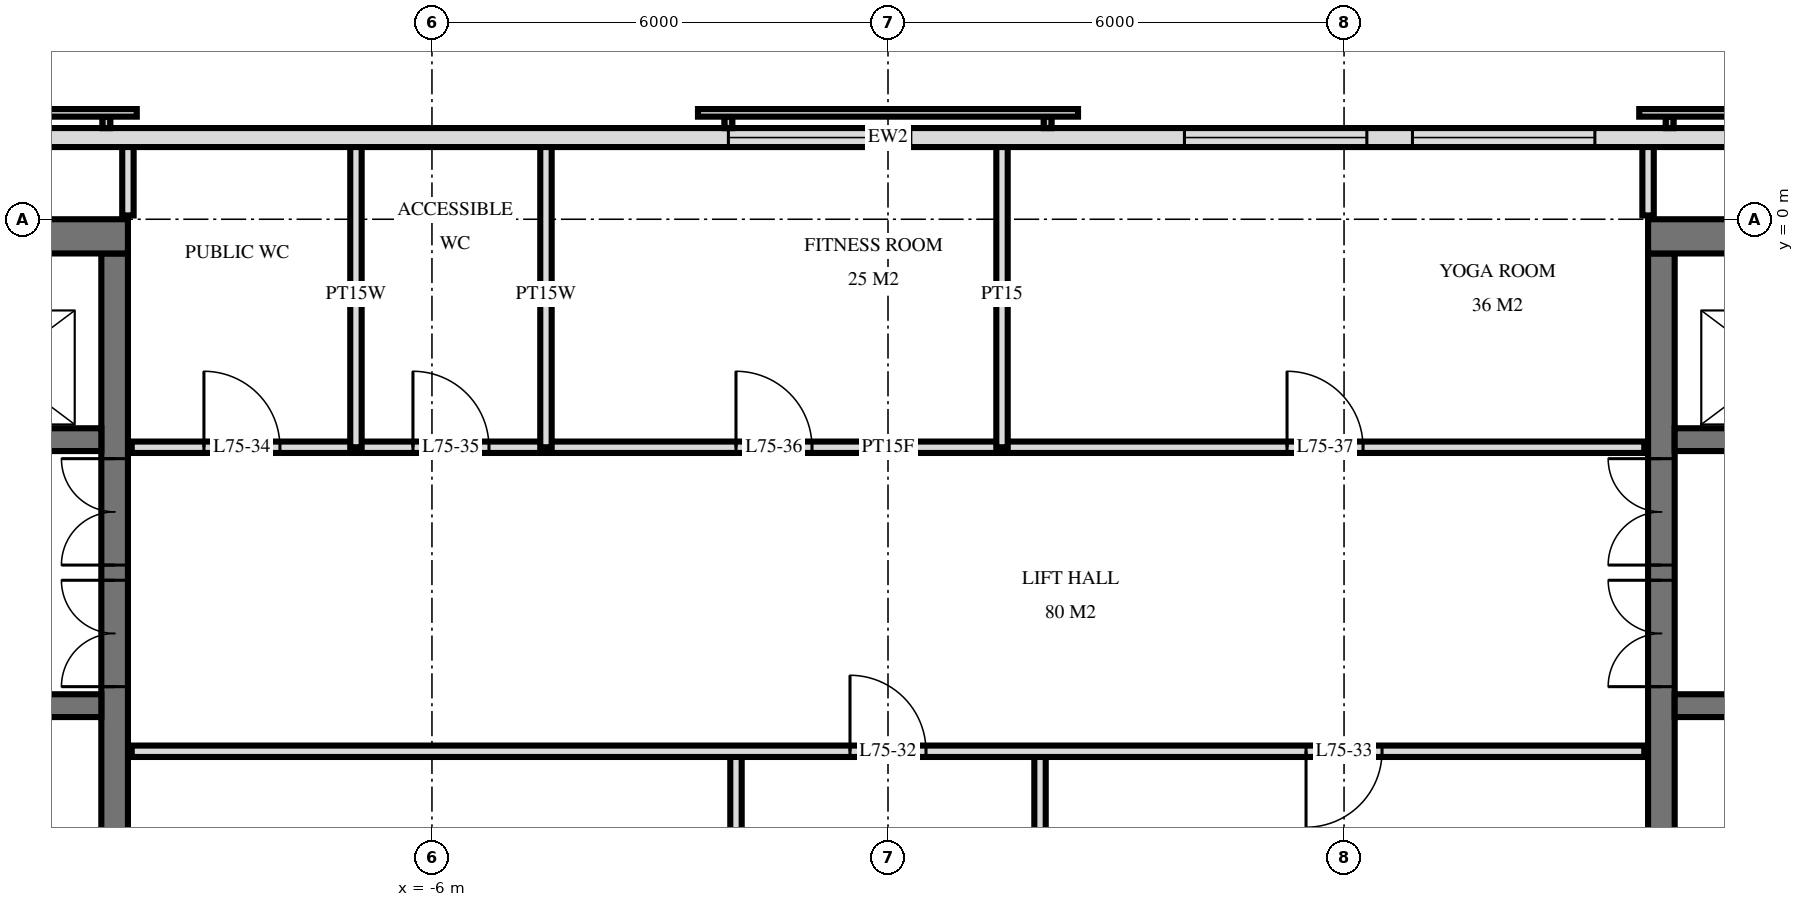
"""IFC4 building model, lengths in metres.
Left out: names, types, materials, properties, quantities, classifications, styles, units other than length and angle.
Written with IfcOpenShell. Run it as: python <this file> out.ifc"""

import sys

from ifc_helpers import new_model, si_unit, direction, frame, frame_2d, origin, place, context, subcontext, project, spatial, rectangle, extrude, element, fill, save


model = new_model("IFC4")
c1 = context("Model", 3, precision=1e-05, world=origin(), true_north=direction((0.0, 1.0)))
c2 = subcontext(c1, "Body", "Model", "MODEL_VIEW")
j1 = project(units=[si_unit("LENGTHUNIT", "METRE"), si_unit("PLANEANGLEUNIT", "RADIAN")], contexts=[c1])
p1 = place(None, origin())
s1 = spatial("IfcSite", under=j1, at=p1, CompositionType="ELEMENT")
p2 = place(p1, origin())
s2 = spatial("IfcBuilding", under=s1, at=p2, CompositionType="ELEMENT")
p3 = place(p2, frame((0.0, 0.0, 284.1)))
s3 = spatial("IfcBuildingStorey", under=s2, at=p3, CompositionType="ELEMENT", Elevation=284.1)
p4 = place(p3, frame((-19.5, -0.225, 0.0), z_axis=(0.0, 0.0, 1.0), x_axis=(1.0, 0.0, 0.0)))
e1 = element("IfcWall", 1, at=p4, inside=s3, PredefinedType="SHEAR", context=c2, shape_type="SweptSolid", body=[
    extrude(rectangle(XDim=9.5, YDim=0.45, at=frame_2d((4.75, 0.0))), origin(), (0.0, 0.0, 1.0), 3.5),
])
p5 = place(p3, frame((-10.175, -14.55, 0.0), z_axis=(0.0, 0.0, 1.0), x_axis=(0.0, 1.0, 0.0)))
e2 = element("IfcWall", 2, at=p5, inside=s3, PredefinedType="SHEAR", context=c2, shape_type="SweptSolid", body=[
    extrude(rectangle(XDim=14.1, YDim=0.35, at=frame_2d((7.05, 0.0))), origin(), (0.0, 0.0, 1.0), 3.5),
])
p6 = place(p5, frame((8.4, 0.0, 0.0)))
e3 = element("IfcOpeningElement", 3, at=p6, cuts=e2, PredefinedType="OPENING", context=c2, shape_type="SweptSolid", body=[
    extrude(rectangle(XDim=1.4, YDim=2.4, at=frame_2d((0.7, 1.2))), frame((0.0, 0.185, 0.0), z_axis=(0.0, -1.0, 0.0), x_axis=(1.0, 0.0, 0.0)), (0.0, 0.0, 1.0), 0.37),
])
p7 = place(p5, frame((10.0, 0.0, 0.0)))
e4 = element("IfcOpeningElement", 4, at=p7, cuts=e2, PredefinedType="OPENING", context=c2, shape_type="SweptSolid", body=[
    extrude(rectangle(XDim=1.4, YDim=2.4, at=frame_2d((0.7, 1.2))), frame((0.0, 0.185, 0.0), z_axis=(0.0, -1.0, 0.0), x_axis=(1.0, 0.0, 0.0)), (0.0, 0.0, 1.0), 0.37),
])
p8 = place(p5, frame((4.0, 0.0, 0.0)))
e5 = element("IfcOpeningElement", 5, at=p8, cuts=e2, PredefinedType="OPENING", context=c2, shape_type="SweptSolid", body=[
    extrude(rectangle(XDim=1.2, YDim=2.1, at=frame_2d((0.6, 1.05))), frame((0.0, 0.185, 0.0), z_axis=(0.0, -1.0, 0.0), x_axis=(1.0, 0.0, 0.0)), (0.0, 0.0, 1.0), 0.37),
])
p9 = place(p3, frame((-19.05, -2.9, 0.0), z_axis=(0.0, 0.0, 1.0), x_axis=(1.0, 0.0, 0.0)))
e6 = element("IfcWall", 6, at=p9, inside=s3, PredefinedType="SHEAR", context=c2, shape_type="SweptSolid", body=[
    extrude(rectangle(XDim=8.7, YDim=0.3, at=frame_2d((4.35, 0.0))), origin(), (0.0, 0.0, 1.0), 3.5),
])
p10 = place(p9, frame((6.8, 0.0, 0.0)))
e7 = element("IfcOpeningElement", 7, at=p10, cuts=e6, PredefinedType="OPENING", context=c2, shape_type="SweptSolid", body=[
    extrude(rectangle(XDim=1.1, YDim=2.1, at=frame_2d((0.55, 1.05))), frame((0.0, 0.16, 0.0), z_axis=(0.0, -1.0, 0.0), x_axis=(1.0, 0.0, 0.0)), (0.0, 0.0, 1.0), 0.32),
])
p11 = place(p9, frame((3.8, 0.0, 0.0)))
e8 = element("IfcOpeningElement", 8, at=p11, cuts=e6, PredefinedType="OPENING", context=c2, shape_type="SweptSolid", body=[
    extrude(rectangle(XDim=1.1, YDim=2.1, at=frame_2d((0.55, 1.05))), frame((0.0, 0.16, 0.0), z_axis=(0.0, -1.0, 0.0), x_axis=(1.0, 0.0, 0.0)), (0.0, 0.0, 1.0), 0.32),
])
p12 = place(p9, frame((1.613, 0.0, 0.0)))
e9 = element("IfcOpeningElement", 9, at=p12, cuts=e6, PredefinedType="OPENING", context=c2, shape_type="SweptSolid", body=[
    extrude(rectangle(XDim=0.9, YDim=2.1, at=frame_2d((0.45, 1.05))), frame((0.0, 0.16, 0.0), z_axis=(0.0, -1.0, 0.0), x_axis=(1.0, 0.0, 0.0)), (0.0, 0.0, 1.0), 0.32),
])
p13 = place(p9, frame((0.188, 0.0, 0.0)))
e10 = element("IfcOpeningElement", 10, at=p13, cuts=e6, PredefinedType="OPENING", context=c2, shape_type="SweptSolid", body=[
    extrude(rectangle(XDim=0.9, YDim=2.1, at=frame_2d((0.45, 1.05))), frame((0.0, 0.16, 0.0), z_axis=(0.0, -1.0, 0.0), x_axis=(1.0, 0.0, 0.0)), (0.0, 0.0, 1.0), 0.32),
])
p14 = place(p3, frame((-19.05, -6.4, 0.0), z_axis=(0.0, 0.0, 1.0), x_axis=(1.0, 0.0, 0.0)))
e11 = element("IfcWall", 11, at=p14, inside=s3, PredefinedType="SHEAR", context=c2, shape_type="SweptSolid", body=[
    extrude(rectangle(XDim=8.7, YDim=0.3, at=frame_2d((4.35, 0.0))), origin(), (0.0, 0.0, 1.0), 3.5),
])
p15 = place(p14, frame((0.8, 0.0, 0.0)))
e12 = element("IfcOpeningElement", 12, at=p15, cuts=e11, PredefinedType="OPENING", context=c2, shape_type="SweptSolid", body=[
    extrude(rectangle(XDim=1.1, YDim=2.1, at=frame_2d((0.55, 1.05))), frame((0.0, 0.16, 0.0), z_axis=(0.0, -1.0, 0.0), x_axis=(1.0, 0.0, 0.0)), (0.0, 0.0, 1.0), 0.32),
])
p16 = place(p3, frame((10.0, -0.225, 0.0), z_axis=(0.0, 0.0, 1.0), x_axis=(1.0, 0.0, 0.0)))
e13 = element("IfcWall", 13, at=p16, inside=s3, PredefinedType="SHEAR", context=c2, shape_type="SweptSolid", body=[
    extrude(rectangle(XDim=9.5, YDim=0.45, at=frame_2d((4.75, 0.0))), origin(), (0.0, 0.0, 1.0), 3.5),
])
p17 = place(p3, frame((10.175, -14.55, 0.0), z_axis=(0.0, 0.0, 1.0), x_axis=(0.0, 1.0, 0.0)))
e14 = element("IfcWall", 14, at=p17, inside=s3, PredefinedType="SHEAR", context=c2, shape_type="SweptSolid", body=[
    extrude(rectangle(XDim=14.1, YDim=0.35, at=frame_2d((7.05, 0.0))), origin(), (0.0, 0.0, 1.0), 3.5),
])
p18 = place(p17, frame((8.4, 0.0, 0.0)))
e15 = element("IfcOpeningElement", 15, at=p18, cuts=e14, PredefinedType="OPENING", context=c2, shape_type="SweptSolid", body=[
    extrude(rectangle(XDim=1.4, YDim=2.4, at=frame_2d((0.7, 1.2))), frame((0.0, 0.185, 0.0), z_axis=(0.0, -1.0, 0.0), x_axis=(1.0, 0.0, 0.0)), (0.0, 0.0, 1.0), 0.37),
])
p19 = place(p17, frame((10.0, 0.0, 0.0)))
e16 = element("IfcOpeningElement", 16, at=p19, cuts=e14, PredefinedType="OPENING", context=c2, shape_type="SweptSolid", body=[
    extrude(rectangle(XDim=1.4, YDim=2.4, at=frame_2d((0.7, 1.2))), frame((0.0, 0.185, 0.0), z_axis=(0.0, -1.0, 0.0), x_axis=(1.0, 0.0, 0.0)), (0.0, 0.0, 1.0), 0.37),
])
p20 = place(p17, frame((4.0, 0.0, 0.0)))
e17 = element("IfcOpeningElement", 17, at=p20, cuts=e14, PredefinedType="OPENING", context=c2, shape_type="SweptSolid", body=[
    extrude(rectangle(XDim=1.2, YDim=2.1, at=frame_2d((0.6, 1.05))), frame((0.0, 0.185, 0.0), z_axis=(0.0, -1.0, 0.0), x_axis=(1.0, 0.0, 0.0)), (0.0, 0.0, 1.0), 0.37),
])
p21 = place(p3, frame((10.35, -2.9, 0.0), z_axis=(0.0, 0.0, 1.0), x_axis=(1.0, 0.0, 0.0)))
e18 = element("IfcWall", 18, at=p21, inside=s3, PredefinedType="SHEAR", context=c2, shape_type="SweptSolid", body=[
    extrude(rectangle(XDim=8.7, YDim=0.3, at=frame_2d((4.35, 0.0))), origin(), (0.0, 0.0, 1.0), 3.5),
])
p22 = place(p21, frame((0.8, 0.0, 0.0)))
e19 = element("IfcOpeningElement", 19, at=p22, cuts=e18, PredefinedType="OPENING", context=c2, shape_type="SweptSolid", body=[
    extrude(rectangle(XDim=1.1, YDim=2.1, at=frame_2d((0.55, 1.05))), frame((0.0, 0.16, 0.0), z_axis=(0.0, -1.0, 0.0), x_axis=(1.0, 0.0, 0.0)), (0.0, 0.0, 1.0), 0.32),
])
p23 = place(p21, frame((3.8, 0.0, 0.0)))
e20 = element("IfcOpeningElement", 20, at=p23, cuts=e18, PredefinedType="OPENING", context=c2, shape_type="SweptSolid", body=[
    extrude(rectangle(XDim=1.1, YDim=2.1, at=frame_2d((0.55, 1.05))), frame((0.0, 0.16, 0.0), z_axis=(0.0, -1.0, 0.0), x_axis=(1.0, 0.0, 0.0)), (0.0, 0.0, 1.0), 0.32),
])
p24 = place(p21, frame((6.188, 0.0, 0.0)))
e21 = element("IfcOpeningElement", 21, at=p24, cuts=e18, PredefinedType="OPENING", context=c2, shape_type="SweptSolid", body=[
    extrude(rectangle(XDim=0.9, YDim=2.1, at=frame_2d((0.45, 1.05))), frame((0.0, 0.16, 0.0), z_axis=(0.0, -1.0, 0.0), x_axis=(1.0, 0.0, 0.0)), (0.0, 0.0, 1.0), 0.32),
])
p25 = place(p21, frame((7.613, 0.0, 0.0)))
e22 = element("IfcOpeningElement", 22, at=p25, cuts=e18, PredefinedType="OPENING", context=c2, shape_type="SweptSolid", body=[
    extrude(rectangle(XDim=0.9, YDim=2.1, at=frame_2d((0.45, 1.05))), frame((0.0, 0.16, 0.0), z_axis=(0.0, -1.0, 0.0), x_axis=(1.0, 0.0, 0.0)), (0.0, 0.0, 1.0), 0.32),
])
p26 = place(p3, frame((10.35, -6.4, 0.0), z_axis=(0.0, 0.0, 1.0), x_axis=(1.0, 0.0, 0.0)))
e23 = element("IfcWall", 23, at=p26, inside=s3, PredefinedType="SHEAR", context=c2, shape_type="SweptSolid", body=[
    extrude(rectangle(XDim=8.7, YDim=0.3, at=frame_2d((4.35, 0.0))), origin(), (0.0, 0.0, 1.0), 3.5),
])
p27 = place(p26, frame((6.8, 0.0, 0.0)))
e24 = element("IfcOpeningElement", 24, at=p27, cuts=e23, PredefinedType="OPENING", context=c2, shape_type="SweptSolid", body=[
    extrude(rectangle(XDim=1.1, YDim=2.1, at=frame_2d((0.55, 1.05))), frame((0.0, 0.16, 0.0), z_axis=(0.0, -1.0, 0.0), x_axis=(1.0, 0.0, 0.0)), (0.0, 0.0, 1.0), 0.32),
])
p28 = place(p3, frame((18.575, 1.075, 0.0), z_axis=(0.0, 0.0, 1.0), x_axis=(-1.0, 0.0, 0.0)))
e25 = element("IfcWall", 25, at=p28, inside=s3, PredefinedType="SOLIDWALL", context=c2, shape_type="SweptSolid", body=[
    extrude(rectangle(XDim=37.151, YDim=0.25, at=frame_2d((18.575, 0.0))), origin(), (0.0, 0.0, 1.0), 3.22),
])
p29 = place(p28, frame((9.275, 0.0, 0.9)))
e26 = element("IfcOpeningElement", 26, at=p29, cuts=e25, PredefinedType="OPENING", context=c2, shape_type="SweptSolid", body=[
    extrude(rectangle(XDim=2.4, YDim=1.5, at=frame_2d((1.2, 0.75))), frame((0.0, 0.135, 0.0), z_axis=(0.0, -1.0, 0.0), x_axis=(1.0, 0.0, 0.0)), (0.0, 0.0, 1.0), 0.27),
])
p30 = place(p28, frame((12.275, 0.0, 0.9)))
e27 = element("IfcOpeningElement", 27, at=p30, cuts=e25, PredefinedType="OPENING", context=c2, shape_type="SweptSolid", body=[
    extrude(rectangle(XDim=2.4, YDim=1.5, at=frame_2d((1.2, 0.75))), frame((0.0, 0.135, 0.0), z_axis=(0.0, -1.0, 0.0), x_axis=(1.0, 0.0, 0.0)), (0.0, 0.0, 1.0), 0.27),
])
p31 = place(p28, frame((18.275, 0.0, 0.9)))
e28 = element("IfcOpeningElement", 28, at=p31, cuts=e25, PredefinedType="OPENING", context=c2, shape_type="SweptSolid", body=[
    extrude(rectangle(XDim=2.4, YDim=1.5, at=frame_2d((1.2, 0.75))), frame((0.0, 0.135, 0.0), z_axis=(0.0, -1.0, 0.0), x_axis=(1.0, 0.0, 0.0)), (0.0, 0.0, 1.0), 0.27),
])
p32 = place(p3, frame((10.0, 0.05, 0.0), z_axis=(0.0, 0.0, 1.0), x_axis=(0.0, 1.0, 0.0)))
e29 = element("IfcWall", 29, at=p32, inside=s3, PredefinedType="PARTITIONING", context=c2, shape_type="SweptSolid", body=[
    extrude(rectangle(XDim=0.97, YDim=0.15, at=frame_2d((0.485, 0.0))), origin(), (0.0, 0.0, 1.0), 3.22),
])
p33 = place(p3, frame((2.0, -11.0, 0.0), z_axis=(0.0, 0.0, 1.0), x_axis=(0.0, 1.0, 0.0)))
e30 = element("IfcWall", 30, at=p33, inside=s3, PredefinedType="PARTITIONING", context=c2, shape_type="SweptSolid", body=[
    extrude(rectangle(XDim=4.0, YDim=0.15, at=frame_2d((2.0, 0.0))), origin(), (0.0, 0.0, 1.0), 3.22),
])
p34 = place(p3, frame((1.5, -3.0, 0.0), z_axis=(0.0, 0.0, 1.0), x_axis=(0.0, 1.0, 0.0)))
e31 = element("IfcWall", 31, at=p34, inside=s3, PredefinedType="PARTITIONING", context=c2, shape_type="SweptSolid", body=[
    extrude(rectangle(XDim=4.02, YDim=0.15, at=frame_2d((2.01, 0.0))), origin(), (0.0, 0.0, 1.0), 3.22),
])
p35 = place(p3, frame((-2.0, -11.0, 0.0), z_axis=(0.0, 0.0, 1.0), x_axis=(0.0, 1.0, 0.0)))
e32 = element("IfcWall", 32, at=p35, inside=s3, PredefinedType="PARTITIONING", context=c2, shape_type="SweptSolid", body=[
    extrude(rectangle(XDim=4.0, YDim=0.15, at=frame_2d((2.0, 0.0))), origin(), (0.0, 0.0, 1.0), 3.22),
])
for number, where, z_axis, x_axis in (
    (33, (-4.5, -3.0, 0.0), (0.0, 0.0, 1.0), (0.0, 1.0, 0.0)),
    (34, (-7.0, -3.0, 0.0), (0.0, 0.0, 1.0), (0.0, 1.0, 0.0)),
):
    element("IfcWall", number, at=place(p3, frame(where, z_axis=z_axis, x_axis=x_axis)), inside=s3, PredefinedType="PLUMBINGWALL", context=c2, shape_type="SweptSolid", body=[
        extrude(rectangle(XDim=4.02, YDim=0.15, at=frame_2d((2.01, 0.0))), origin(), (0.0, 0.0, 1.0), 3.22),
    ])
p36 = place(p3, frame((-10.0, 0.05, 0.0), z_axis=(0.0, 0.0, 1.0), x_axis=(0.0, 1.0, 0.0)))
e35 = element("IfcWall", 35, at=p36, inside=s3, PredefinedType="PLUMBINGWALL", context=c2, shape_type="SweptSolid", body=[
    extrude(rectangle(XDim=0.97, YDim=0.15, at=frame_2d((0.485, 0.0))), origin(), (0.0, 0.0, 1.0), 3.22),
])
p37 = place(p3, frame((-9.95, -7.0, 0.0), z_axis=(0.0, 0.0, 1.0), x_axis=(1.0, 0.0, 0.0)))
e36 = element("IfcWall", 36, at=p37, inside=s3, PredefinedType="PARTITIONING", context=c2, shape_type="SweptSolid", body=[
    extrude(rectangle(XDim=19.9, YDim=0.15, at=frame_2d((9.95, 0.0))), origin(), (0.0, 0.0, 1.0), 3.22),
])
p38 = place(p37, frame((9.45, 0.0, 0.0)))
e37 = element("IfcOpeningElement", 37, at=p38, cuts=e36, PredefinedType="OPENING", context=c2, shape_type="SweptSolid", body=[
    extrude(rectangle(XDim=1.0, YDim=2.1, at=frame_2d((0.5, 1.05))), frame((0.0, 0.085, 0.0), z_axis=(0.0, -1.0, 0.0), x_axis=(1.0, 0.0, 0.0)), (0.0, 0.0, 1.0), 0.17),
])
p39 = place(p37, frame((15.45, 0.0, 0.0)))
e38 = element("IfcOpeningElement", 38, at=p39, cuts=e36, PredefinedType="OPENING", context=c2, shape_type="SweptSolid", body=[
    extrude(rectangle(XDim=1.0, YDim=2.1, at=frame_2d((0.5, 1.05))), frame((0.0, 0.085, 0.0), z_axis=(0.0, -1.0, 0.0), x_axis=(1.0, 0.0, 0.0)), (0.0, 0.0, 1.0), 0.17),
])
p40 = place(p3, frame((-9.95, -3.0, 0.0), z_axis=(0.0, 0.0, 1.0), x_axis=(1.0, 0.0, 0.0)))
e39 = element("IfcWall", 39, at=p40, inside=s3, PredefinedType="PARTITIONING", context=c2, shape_type="SweptSolid", body=[
    extrude(rectangle(XDim=19.9, YDim=0.15, at=frame_2d((9.95, 0.0))), origin(), (0.0, 0.0, 1.0), 3.22),
])
p41 = place(p40, frame((0.95, 0.0, 0.0)))
e40 = element("IfcOpeningElement", 40, at=p41, cuts=e39, PredefinedType="OPENING", context=c2, shape_type="SweptSolid", body=[
    extrude(rectangle(XDim=1.0, YDim=2.1, at=frame_2d((0.5, 1.05))), frame((0.0, 0.085, 0.0), z_axis=(0.0, -1.0, 0.0), x_axis=(1.0, 0.0, 0.0)), (0.0, 0.0, 1.0), 0.17),
])
p42 = place(p40, frame((3.7, 0.0, 0.0)))
e41 = element("IfcOpeningElement", 41, at=p42, cuts=e39, PredefinedType="OPENING", context=c2, shape_type="SweptSolid", body=[
    extrude(rectangle(XDim=1.0, YDim=2.1, at=frame_2d((0.5, 1.05))), frame((0.0, 0.085, 0.0), z_axis=(0.0, -1.0, 0.0), x_axis=(1.0, 0.0, 0.0)), (0.0, 0.0, 1.0), 0.17),
])
p43 = place(p40, frame((7.95, 0.0, 0.0)))
e42 = element("IfcOpeningElement", 42, at=p43, cuts=e39, PredefinedType="OPENING", context=c2, shape_type="SweptSolid", body=[
    extrude(rectangle(XDim=1.0, YDim=2.1, at=frame_2d((0.5, 1.05))), frame((0.0, 0.085, 0.0), z_axis=(0.0, -1.0, 0.0), x_axis=(1.0, 0.0, 0.0)), (0.0, 0.0, 1.0), 0.17),
])
p44 = place(p40, frame((15.2, 0.0, 0.0)))
e43 = element("IfcOpeningElement", 43, at=p44, cuts=e39, PredefinedType="OPENING", context=c2, shape_type="SweptSolid", body=[
    extrude(rectangle(XDim=1.0, YDim=2.1, at=frame_2d((0.5, 1.05))), frame((0.0, 0.085, 0.0), z_axis=(0.0, -1.0, 0.0), x_axis=(1.0, 0.0, 0.0)), (0.0, 0.0, 1.0), 0.17),
])
p45 = place(p29, origin())
e44 = element("IfcWindow", 44, at=p45, inside=s3, PartitioningType="SINGLE_PANEL", PredefinedType="WINDOW", context=c2, shape_type="SweptSolid", body=[
    extrude(rectangle(XDim=2.4, YDim=1.5, at=frame_2d((1.2, 0.75))), frame((0.0, 0.03, 0.0), z_axis=(0.0, -1.0, 0.0), x_axis=(1.0, 0.0, 0.0)), (0.0, 0.0, 1.0), 0.06),
])
fill(e26, e44)
p46 = place(p30, origin())
e45 = element("IfcWindow", 45, at=p46, inside=s3, PartitioningType="SINGLE_PANEL", PredefinedType="WINDOW", context=c2, shape_type="SweptSolid", body=[
    extrude(rectangle(XDim=2.4, YDim=1.5, at=frame_2d((1.2, 0.75))), frame((0.0, 0.03, 0.0), z_axis=(0.0, -1.0, 0.0), x_axis=(1.0, 0.0, 0.0)), (0.0, 0.0, 1.0), 0.06),
])
fill(e27, e45)
p47 = place(p31, origin())
e46 = element("IfcWindow", 46, at=p47, inside=s3, PartitioningType="SINGLE_PANEL", PredefinedType="WINDOW", context=c2, shape_type="SweptSolid", body=[
    extrude(rectangle(XDim=2.4, YDim=1.5, at=frame_2d((1.2, 0.75))), frame((0.0, 0.03, 0.0), z_axis=(0.0, -1.0, 0.0), x_axis=(1.0, 0.0, 0.0)), (0.0, 0.0, 1.0), 0.06),
])
fill(e28, e46)
p48 = place(p6, origin())
e47 = element("IfcDoor", 47, at=p48, inside=s3, OperationType="DOUBLE_DOOR_SINGLE_SWING", PredefinedType="DOOR", context=c2, shape_type="SweptSolid", body=[
    extrude(rectangle(XDim=1.4, YDim=2.4, at=frame_2d((0.7, 1.2))), frame((0.0, 0.025, 0.0), z_axis=(0.0, -1.0, 0.0), x_axis=(1.0, 0.0, 0.0)), (0.0, 0.0, 1.0), 0.05),
])
fill(e3, e47)
p49 = place(p7, origin())
e48 = element("IfcDoor", 48, at=p49, inside=s3, OperationType="DOUBLE_DOOR_SINGLE_SWING", PredefinedType="DOOR", context=c2, shape_type="SweptSolid", body=[
    extrude(rectangle(XDim=1.4, YDim=2.4, at=frame_2d((0.7, 1.2))), frame((0.0, 0.025, 0.0), z_axis=(0.0, -1.0, 0.0), x_axis=(1.0, 0.0, 0.0)), (0.0, 0.0, 1.0), 0.05),
])
fill(e4, e48)
p50 = place(p18, origin())
e49 = element("IfcDoor", 49, at=p50, inside=s3, OperationType="DOUBLE_DOOR_SINGLE_SWING", PredefinedType="DOOR", context=c2, shape_type="SweptSolid", body=[
    extrude(rectangle(XDim=1.4, YDim=2.4, at=frame_2d((0.7, 1.2))), frame((0.0, 0.025, 0.0), z_axis=(0.0, -1.0, 0.0), x_axis=(1.0, 0.0, 0.0)), (0.0, 0.0, 1.0), 0.05),
])
fill(e15, e49)
p51 = place(p19, origin())
e50 = element("IfcDoor", 50, at=p51, inside=s3, OperationType="DOUBLE_DOOR_SINGLE_SWING", PredefinedType="DOOR", context=c2, shape_type="SweptSolid", body=[
    extrude(rectangle(XDim=1.4, YDim=2.4, at=frame_2d((0.7, 1.2))), frame((0.0, 0.025, 0.0), z_axis=(0.0, -1.0, 0.0), x_axis=(1.0, 0.0, 0.0)), (0.0, 0.0, 1.0), 0.05),
])
fill(e16, e50)
p52 = place(p38, origin())
e51 = element("IfcDoor", 51, at=p52, inside=s3, OperationType="SINGLE_SWING_RIGHT", PredefinedType="DOOR", context=c2, shape_type="SweptSolid", body=[
    extrude(rectangle(XDim=1.0, YDim=2.1, at=frame_2d((0.5, 1.05))), frame((0.0, 0.025, 0.0), z_axis=(0.0, -1.0, 0.0), x_axis=(1.0, 0.0, 0.0)), (0.0, 0.0, 1.0), 0.05),
])
fill(e37, e51)
p53 = place(p39, frame((0.5, 0.0, 0.0), z_axis=(0.0, 0.0, 1.0), x_axis=(-1.0, 0.0, 0.0)))
e52 = element("IfcDoor", 52, at=p53, inside=s3, OperationType="SINGLE_SWING_LEFT", PredefinedType="DOOR", context=c2, shape_type="SweptSolid", body=[
    extrude(rectangle(XDim=1.0, YDim=2.1, at=frame_2d((0.0, 1.05))), frame((0.0, -0.025, 0.0), z_axis=(0.0, 1.0, 0.0), x_axis=(-1.0, 0.0, 0.0)), (0.0, 0.0, 1.0), 0.05),
])
fill(e38, e52)
p54 = place(p41, origin())
e53 = element("IfcDoor", 53, at=p54, inside=s3, OperationType="SINGLE_SWING_RIGHT", PredefinedType="DOOR", context=c2, shape_type="SweptSolid", body=[
    extrude(rectangle(XDim=1.0, YDim=2.1, at=frame_2d((0.5, 1.05))), frame((0.0, 0.025, 0.0), z_axis=(0.0, -1.0, 0.0), x_axis=(1.0, 0.0, 0.0)), (0.0, 0.0, 1.0), 0.05),
])
fill(e40, e53)
p55 = place(p42, origin())
e54 = element("IfcDoor", 54, at=p55, inside=s3, OperationType="SINGLE_SWING_RIGHT", PredefinedType="DOOR", context=c2, shape_type="SweptSolid", body=[
    extrude(rectangle(XDim=1.0, YDim=2.1, at=frame_2d((0.5, 1.05))), frame((0.0, 0.025, 0.0), z_axis=(0.0, -1.0, 0.0), x_axis=(1.0, 0.0, 0.0)), (0.0, 0.0, 1.0), 0.05),
])
fill(e41, e54)
p56 = place(p43, origin())
e55 = element("IfcDoor", 55, at=p56, inside=s3, OperationType="SINGLE_SWING_RIGHT", PredefinedType="DOOR", context=c2, shape_type="SweptSolid", body=[
    extrude(rectangle(XDim=1.0, YDim=2.1, at=frame_2d((0.5, 1.05))), frame((0.0, 0.025, 0.0), z_axis=(0.0, -1.0, 0.0), x_axis=(1.0, 0.0, 0.0)), (0.0, 0.0, 1.0), 0.05),
])
fill(e42, e55)
p57 = place(p44, origin())
e56 = element("IfcDoor", 56, at=p57, inside=s3, OperationType="SINGLE_SWING_RIGHT", PredefinedType="DOOR", context=c2, shape_type="SweptSolid", body=[
    extrude(rectangle(XDim=1.0, YDim=2.1, at=frame_2d((0.5, 1.05))), frame((0.0, 0.025, 0.0), z_axis=(0.0, -1.0, 0.0), x_axis=(1.0, 0.0, 0.0)), (0.0, 0.0, 1.0), 0.05),
])
fill(e43, e56)
save(model, sys.argv[1])
